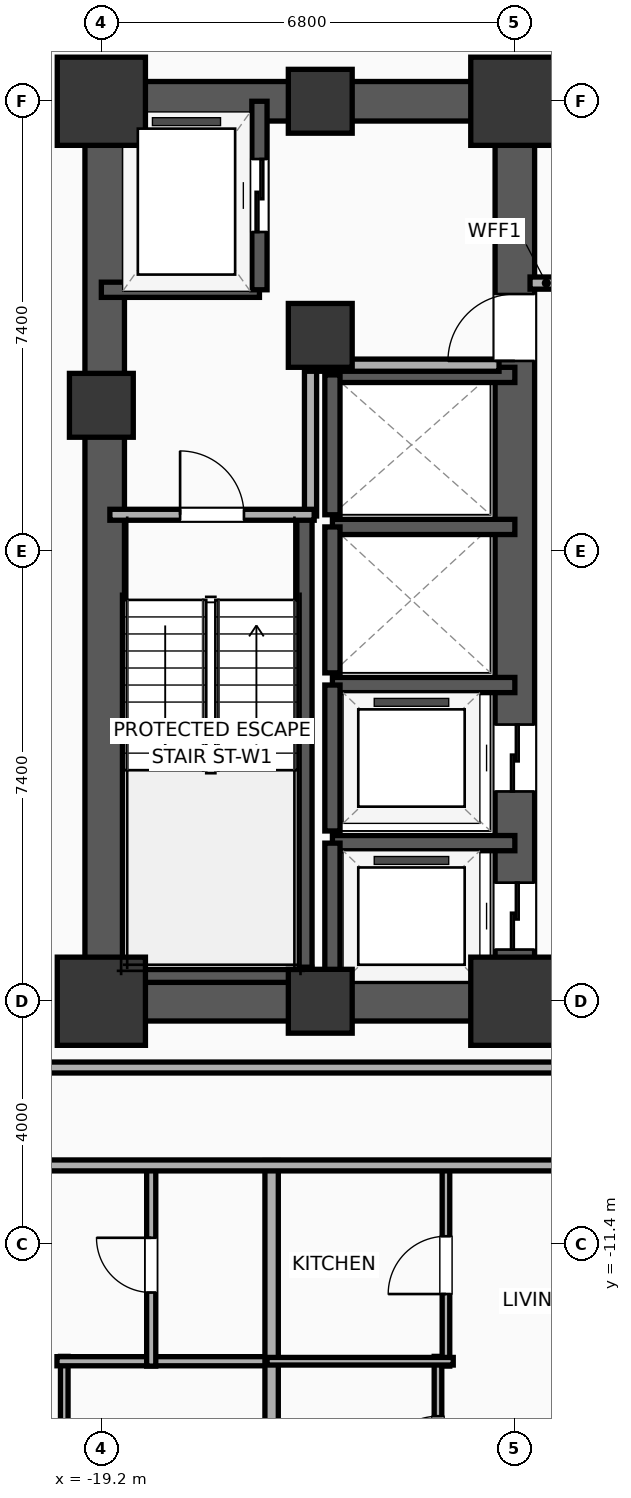
"""IFC4 building model, lengths in metres.
Left out: names, types, materials, properties, quantities, classifications, styles, units other than length and angle.
Written with IfcOpenShell. Run it as: python <this file> out.ifc"""

import sys

from ifc_helpers import new_model, si_unit, direction, frame, frame_2d, origin, origin_2d, place, context, subcontext, project, spatial, rectangle, extrude, element, fill, save


model = new_model("IFC4")
c1 = context("Model", 3, precision=1e-05, world=origin(), true_north=direction((0.0, 1.0)))
c2 = subcontext(c1, "Body", "Model", "MODEL_VIEW")
j1 = project(units=[si_unit("LENGTHUNIT", "METRE"), si_unit("PLANEANGLEUNIT", "RADIAN")], contexts=[c1])
p1 = place(None, origin())
s1 = spatial("IfcSite", under=j1, at=p1, CompositionType="ELEMENT")
p2 = place(p1, origin())
s2 = spatial("IfcBuilding", under=s1, at=p2, CompositionType="ELEMENT")
p3 = place(p2, frame((0.0, 0.0, 41.6)))
s3 = spatial("IfcBuildingStorey", under=s2, at=p3, CompositionType="ELEMENT", Elevation=41.6)
p4 = place(p3, frame((-19.2, -7.4, 0.0), z_axis=(0.0, 0.0, 1.0), x_axis=(1.0, 0.0, 0.0)))
e1 = element("IfcColumn", 1, at=p4, inside=s3, PredefinedType="COLUMN", context=c2, shape_type="SweptSolid", body=[
    extrude(rectangle(XDim=1.45, YDim=1.45, at=origin_2d()), origin(), (0.0, 0.0, 1.0), 3.9),
])
p5 = place(p3, frame((-19.2, 2.4, 0.0), z_axis=(0.0, 0.0, 1.0), x_axis=(1.0, 0.0, 0.0)))
e2 = element("IfcColumn", 2, at=p5, inside=s3, PredefinedType="COLUMN", context=c2, shape_type="SweptSolid", body=[
    extrude(rectangle(XDim=1.05, YDim=1.05, at=origin_2d()), origin(), (0.0, 0.0, 1.0), 3.9),
])
p6 = place(p3, frame((-19.2, 7.4, 0.0), z_axis=(0.0, 0.0, 1.0), x_axis=(1.0, 0.0, 0.0)))
e3 = element("IfcColumn", 3, at=p6, inside=s3, PredefinedType="COLUMN", context=c2, shape_type="SweptSolid", body=[
    extrude(rectangle(XDim=1.45, YDim=1.45, at=origin_2d()), origin(), (0.0, 0.0, 1.0), 3.9),
])
for number, where, z_axis, x_axis in (
    (4, (-15.6, -7.4, 0.0), (0.0, 0.0, 1.0), (1.0, 0.0, 0.0)),
    (5, (-15.6, 7.4, 0.0), (0.0, 0.0, 1.0), (1.0, 0.0, 0.0)),
):
    element("IfcColumn", number, at=place(p3, frame(where, z_axis=z_axis, x_axis=x_axis)), inside=s3, PredefinedType="COLUMN", context=c2, shape_type="SweptSolid", body=[
        extrude(rectangle(XDim=1.05, YDim=1.05, at=origin_2d()), origin(), (0.0, 0.0, 1.0), 3.9),
    ])
p7 = place(p3, frame((-12.4, -7.4, 0.0), z_axis=(0.0, 0.0, 1.0), x_axis=(1.0, 0.0, 0.0)))
e6 = element("IfcColumn", 6, at=p7, inside=s3, PredefinedType="COLUMN", context=c2, shape_type="SweptSolid", body=[
    extrude(rectangle(XDim=1.45, YDim=1.45, at=origin_2d()), origin(), (0.0, 0.0, 1.0), 3.9),
])
p8 = place(p3, frame((-15.6, 3.55, 0.0), z_axis=(0.0, 0.0, 1.0), x_axis=(1.0, 0.0, 0.0)))
e7 = element("IfcColumn", 7, at=p8, inside=s3, PredefinedType="COLUMN", context=c2, shape_type="SweptSolid", body=[
    extrude(rectangle(XDim=1.05, YDim=1.05, at=origin_2d()), origin(), (0.0, 0.0, 1.0), 3.9),
])
p9 = place(p3, frame((-12.4, 7.4, 0.0), z_axis=(0.0, 0.0, 1.0), x_axis=(1.0, 0.0, 0.0)))
e8 = element("IfcColumn", 8, at=p9, inside=s3, PredefinedType="COLUMN", context=c2, shape_type="SweptSolid", body=[
    extrude(rectangle(XDim=1.45, YDim=1.45, at=origin_2d()), origin(), (0.0, 0.0, 1.0), 3.9),
])
for number, where, z_axis, x_axis in (
    (9, (-19.525, -7.4, 0.0), (0.0, 0.0, 1.0), (1.0, 0.0, 0.0)),
    (10, (-19.525, 7.4, 0.0), (0.0, 0.0, 1.0), (1.0, 0.0, 0.0)),
):
    element("IfcWall", number, at=place(p3, frame(where, z_axis=z_axis, x_axis=x_axis)), inside=s3, PredefinedType="SHEAR", context=c2, shape_type="SweptSolid", body=[
        extrude(rectangle(XDim=7.45, YDim=0.65, at=frame_2d((3.725, 0.0))), origin(), (0.0, 0.0, 1.0), 3.65),
    ])
p10 = place(p3, frame((-19.145, -7.4, 0.0), z_axis=(0.0, 0.0, 1.0), x_axis=(0.0, 1.0, 0.0)))
e11 = element("IfcWall", 11, at=p10, inside=s3, PredefinedType="SHEAR", context=c2, shape_type="SweptSolid", body=[
    extrude(rectangle(XDim=14.8, YDim=0.65, at=frame_2d((7.4, 0.0))), origin(), (0.0, 0.0, 1.0), 3.65),
])
p11 = place(p3, frame((-12.4, -7.4, 0.0), z_axis=(0.0, 0.0, 1.0), x_axis=(0.0, 1.0, 0.0)))
e12 = element("IfcWall", 12, at=p11, inside=s3, PredefinedType="SHEAR", context=c2, shape_type="SweptSolid", body=[
    extrude(rectangle(XDim=14.8, YDim=0.65, at=frame_2d((7.4, 0.0))), origin(), (0.0, 0.0, 1.0), 3.65),
])
p12 = place(p11, frame((0.85, 0.0, 0.0)))
e13 = element("IfcOpeningElement", 13, at=p12, cuts=e12, PredefinedType="OPENING", context=c2, shape_type="SweptSolid", body=[
    extrude(rectangle(XDim=1.1, YDim=2.05, at=frame_2d((0.55, 1.025))), frame((0.0, 0.335, 0.0), z_axis=(0.0, -1.0, 0.0), x_axis=(1.0, 0.0, 0.0)), (0.0, 0.0, 1.0), 0.67),
])
p13 = place(p11, frame((3.45, 0.0, 0.0)))
e14 = element("IfcOpeningElement", 14, at=p13, cuts=e12, PredefinedType="OPENING", context=c2, shape_type="SweptSolid", body=[
    extrude(rectangle(XDim=1.1, YDim=2.05, at=frame_2d((0.55, 1.025))), frame((0.0, 0.335, 0.0), z_axis=(0.0, -1.0, 0.0), x_axis=(1.0, 0.0, 0.0)), (0.0, 0.0, 1.0), 0.67),
])
p14 = place(p11, frame((10.53, 0.0, 0.0)))
e15 = element("IfcOpeningElement", 15, at=p14, cuts=e12, PredefinedType="OPENING", context=c2, shape_type="SweptSolid", body=[
    extrude(rectangle(XDim=1.1, YDim=2.05, at=frame_2d((0.55, 1.025))), frame((0.0, 0.335, 0.0), z_axis=(0.0, -1.0, 0.0), x_axis=(1.0, 0.0, 0.0)), (0.0, 0.0, 1.0), 0.67),
])
p15 = place(p3, frame((-15.86, -7.085, 0.0), z_axis=(0.0, 0.0, 1.0), x_axis=(0.0, 1.0, 0.0)))
e16 = element("IfcWall", 16, at=p15, inside=s3, PredefinedType="SOLIDWALL", context=c2, shape_type="SweptSolid", body=[
    extrude(rectangle(XDim=7.685, YDim=0.25, at=frame_2d((3.843, 0.0))), origin(), (0.0, 0.0, 1.0), 3.65),
])
p16 = place(p3, frame((-19.2, -6.965, 0.0), z_axis=(0.0, 0.0, 1.0), x_axis=(1.0, 0.0, 0.0)))
e17 = element("IfcWall", 17, at=p16, inside=s3, PredefinedType="SOLIDWALL", context=c2, shape_type="SweptSolid", body=[
    extrude(rectangle(XDim=3.46, YDim=0.25, at=frame_2d((1.73, 0.0))), origin(), (0.0, 0.0, 1.0), 3.65),
])
p17 = place(p3, frame((-19.2, 4.3, 0.0), z_axis=(0.0, 0.0, 1.0), x_axis=(1.0, 0.0, 0.0)))
e18 = element("IfcWall", 18, at=p17, inside=s3, PredefinedType="SOLIDWALL", context=c2, shape_type="SweptSolid", body=[
    extrude(rectangle(XDim=2.6, YDim=0.25, at=frame_2d((1.3, 0.0))), origin(), (0.0, 0.0, 1.0), 3.65),
])
p18 = place(p3, frame((-16.6, 4.3, 0.0), z_axis=(0.0, 0.0, 1.0), x_axis=(0.0, 1.0, 0.0)))
e19 = element("IfcWall", 19, at=p18, inside=s3, PredefinedType="SOLIDWALL", context=c2, shape_type="SweptSolid", body=[
    extrude(rectangle(XDim=3.1, YDim=0.25, at=frame_2d((1.55, 0.0))), origin(), (0.0, 0.0, 1.0), 3.65),
])
p19 = place(p18, frame((0.95, 0.0, 0.0)))
e20 = element("IfcOpeningElement", 20, at=p19, cuts=e19, PredefinedType="OPENING", context=c2, shape_type="SweptSolid", body=[
    extrude(rectangle(XDim=1.2, YDim=2.05, at=frame_2d((0.6, 1.025))), frame((0.0, 0.135, 0.0), z_axis=(0.0, -1.0, 0.0), x_axis=(1.0, 0.0, 0.0)), (0.0, 0.0, 1.0), 0.27),
])
p20 = place(p3, frame((-12.4, -4.8, 0.0), z_axis=(0.0, 0.0, 1.0), x_axis=(-1.0, 0.0, 0.0)))
e21 = element("IfcWall", 21, at=p20, inside=s3, PredefinedType="SOLIDWALL", context=c2, shape_type="SweptSolid", body=[
    extrude(rectangle(XDim=3.0, YDim=0.25, at=frame_2d((1.5, 0.0))), origin(), (0.0, 0.0, 1.0), 3.65),
])
p21 = place(p3, frame((-15.4, -4.8, 0.0), z_axis=(0.0, 0.0, 1.0), x_axis=(0.0, -1.0, 0.0)))
e22 = element("IfcWall", 22, at=p21, inside=s3, PredefinedType="SOLIDWALL", context=c2, shape_type="SweptSolid", body=[
    extrude(rectangle(XDim=2.6, YDim=0.25, at=frame_2d((1.3, 0.0))), origin(), (0.0, 0.0, 1.0), 3.65),
])
p22 = place(p3, frame((-12.4, -2.2, 0.0), z_axis=(0.0, 0.0, 1.0), x_axis=(-1.0, 0.0, 0.0)))
e23 = element("IfcWall", 23, at=p22, inside=s3, PredefinedType="SOLIDWALL", context=c2, shape_type="SweptSolid", body=[
    extrude(rectangle(XDim=3.0, YDim=0.25, at=frame_2d((1.5, 0.0))), origin(), (0.0, 0.0, 1.0), 3.65),
])
p23 = place(p3, frame((-15.4, -2.2, 0.0), z_axis=(0.0, 0.0, 1.0), x_axis=(0.0, -1.0, 0.0)))
e24 = element("IfcWall", 24, at=p23, inside=s3, PredefinedType="SOLIDWALL", context=c2, shape_type="SweptSolid", body=[
    extrude(rectangle(XDim=2.4, YDim=0.25, at=frame_2d((1.2, 0.0))), origin(), (0.0, 0.0, 1.0), 3.65),
])
p24 = place(p3, frame((-12.4, 0.4, 0.0), z_axis=(0.0, 0.0, 1.0), x_axis=(-1.0, 0.0, 0.0)))
e25 = element("IfcWall", 25, at=p24, inside=s3, PredefinedType="SOLIDWALL", context=c2, shape_type="SweptSolid", body=[
    extrude(rectangle(XDim=3.0, YDim=0.25, at=frame_2d((1.5, 0.0))), origin(), (0.0, 0.0, 1.0), 3.65),
])
p25 = place(p3, frame((-15.4, 0.4, 0.0), z_axis=(0.0, 0.0, 1.0), x_axis=(0.0, -1.0, 0.0)))
e26 = element("IfcWall", 26, at=p25, inside=s3, PredefinedType="SOLIDWALL", context=c2, shape_type="SweptSolid", body=[
    extrude(rectangle(XDim=2.4, YDim=0.25, at=frame_2d((1.2, 0.0))), origin(), (0.0, 0.0, 1.0), 3.65),
])
p26 = place(p3, frame((-12.4, 2.9, 0.0), z_axis=(0.0, 0.0, 1.0), x_axis=(-1.0, 0.0, 0.0)))
e27 = element("IfcWall", 27, at=p26, inside=s3, PredefinedType="SOLIDWALL", context=c2, shape_type="SweptSolid", body=[
    extrude(rectangle(XDim=3.0, YDim=0.25, at=frame_2d((1.5, 0.0))), origin(), (0.0, 0.0, 1.0), 3.65),
])
p27 = place(p3, frame((-15.4, 2.9, 0.0), z_axis=(0.0, 0.0, 1.0), x_axis=(0.0, -1.0, 0.0)))
e28 = element("IfcWall", 28, at=p27, inside=s3, PredefinedType="SOLIDWALL", context=c2, shape_type="SweptSolid", body=[
    extrude(rectangle(XDim=2.3, YDim=0.25, at=frame_2d((1.15, 0.0))), origin(), (0.0, 0.0, 1.0), 3.65),
])
p28 = place(p3, frame((-15.76, 0.58, 0.0), z_axis=(0.0, 0.0, 1.0), x_axis=(0.0, 1.0, 0.0)))
e29 = element("IfcWall", 29, at=p28, inside=s3, PredefinedType="PARTITIONING", context=c2, shape_type="SweptSolid", body=[
    extrude(rectangle(XDim=2.52, YDim=0.2, at=frame_2d((1.26, 0.0))), origin(), (0.0, 0.0, 1.0), 3.65),
])
p29 = place(p3, frame((-15.82, 3.06, 0.0), z_axis=(0.0, 0.0, 1.0), x_axis=(1.0, 0.0, 0.0)))
e30 = element("IfcWall", 30, at=p29, inside=s3, PredefinedType="PARTITIONING", context=c2, shape_type="SweptSolid", body=[
    extrude(rectangle(XDim=3.16, YDim=0.2, at=frame_2d((1.58, 0.0))), origin(), (0.0, 0.0, 1.0), 3.65),
])
p30 = place(p3, frame((-19.06, 0.6, 0.0), z_axis=(0.0, 0.0, 1.0), x_axis=(1.0, 0.0, 0.0)))
e31 = element("IfcWall", 31, at=p30, inside=s3, PredefinedType="PARTITIONING", context=c2, shape_type="SweptSolid", body=[
    extrude(rectangle(XDim=3.36, YDim=0.18, at=frame_2d((1.68, 0.0))), origin(), (0.0, 0.0, 1.0), 3.65),
])
p31 = place(p30, frame((1.155, 0.0, 0.0)))
e32 = element("IfcOpeningElement", 32, at=p31, cuts=e31, PredefinedType="OPENING", context=c2, shape_type="SweptSolid", body=[
    extrude(rectangle(XDim=1.05, YDim=2.05, at=frame_2d((0.525, 1.025))), frame((0.0, 0.1, 0.0), z_axis=(0.0, -1.0, 0.0), x_axis=(1.0, 0.0, 0.0)), (0.0, 0.0, 1.0), 0.2),
])
p32 = place(p3, frame((-12.15, 4.41, 0.0), z_axis=(0.0, 0.0, 1.0), x_axis=(1.0, 0.0, 0.0)))
e33 = element("IfcWall", 33, at=p32, inside=s3, PredefinedType="PARTITIONING", context=c2, shape_type="SweptSolid", body=[
    extrude(rectangle(XDim=2.27, YDim=0.2, at=frame_2d((1.135, 0.0))), origin(), (0.0, 0.0, 1.0), 3.65),
])
p33 = place(p32, frame((0.685, 0.0, 0.0)))
e34 = element("IfcOpeningElement", 34, at=p33, cuts=e33, PredefinedType="OPENING", context=c2, shape_type="SweptSolid", body=[
    extrude(rectangle(XDim=0.9, YDim=2.05, at=frame_2d((0.45, 1.025))), frame((0.0, 0.11, 0.0), z_axis=(0.0, -1.0, 0.0), x_axis=(1.0, 0.0, 0.0)), (0.0, 0.0, 1.0), 0.22),
])
for number, where, z_axis, x_axis in (
    (35, (-12.15, 7.12, 0.0), (0.0, 0.0, 1.0), (1.0, 0.0, 0.0)),
    (36, (-12.15, -7.12, 0.0), (0.0, 0.0, 1.0), (1.0, 0.0, 0.0)),
):
    element("IfcWall", number, at=place(p3, frame(where, z_axis=z_axis, x_axis=x_axis)), inside=s3, PredefinedType="PARTITIONING", context=c2, shape_type="SweptSolid", body=[
        extrude(rectangle(XDim=2.27, YDim=0.18, at=frame_2d((1.135, 0.0))), origin(), (0.0, 0.0, 1.0), 2.94),
    ])
p34 = place(p3, frame((-33.41, -8.49, 0.0), z_axis=(0.0, 0.0, 1.0), x_axis=(1.0, 0.0, 0.0)))
e37 = element("IfcWall", 37, at=p34, inside=s3, PredefinedType="PARTITIONING", context=c2, shape_type="SweptSolid", body=[
    extrude(rectangle(XDim=23.53, YDim=0.18, at=frame_2d((11.765, 0.0))), origin(), (0.0, 0.0, 1.0), 3.65),
])
p35 = place(p3, frame((-19.81, -22.36, 0.0), z_axis=(0.0, 0.0, 1.0), x_axis=(0.0, 1.0, 0.0)))
e38 = element("IfcWall", 38, at=p35, inside=s3, PredefinedType="PARTITIONING", context=c2, shape_type="SweptSolid", body=[
    extrude(rectangle(XDim=9.12, YDim=0.125, at=frame_2d((4.56, 0.0))), origin(), (0.0, 0.0, 1.0), 3.65),
])
p36 = place(p35, frame((6.481, 0.0, 0.0)))
e39 = element("IfcOpeningElement", 39, at=p36, cuts=e38, PredefinedType="OPENING", context=c2, shape_type="SweptSolid", body=[
    extrude(rectangle(XDim=0.9, YDim=2.05, at=frame_2d((0.45, 1.025))), frame((0.0, 0.073, 0.0), z_axis=(0.0, -1.0, 0.0), x_axis=(1.0, 0.0, 0.0)), (0.0, 0.0, 1.0), 0.145),
])
p37 = place(p3, frame((-19.93, -13.32, 0.0), z_axis=(0.0, 0.0, 1.0), x_axis=(1.0, 0.0, 0.0)))
e40 = element("IfcWall", 40, at=p37, inside=s3, PredefinedType="PLUMBINGWALL", context=c2, shape_type="SweptSolid", body=[
    extrude(rectangle(XDim=3.605, YDim=0.15, at=frame_2d((1.802, 0.0))), origin(), (0.0, 0.0, 1.0), 3.65),
])
p38 = place(p3, frame((-18.38, -13.4, 0.0), z_axis=(0.0, 0.0, 1.0), x_axis=(0.0, 1.0, 0.0)))
e41 = element("IfcWall", 41, at=p38, inside=s3, PredefinedType="PLUMBINGWALL", context=c2, shape_type="SweptSolid", body=[
    extrude(rectangle(XDim=3.32, YDim=0.15, at=frame_2d((1.66, 0.0))), origin(), (0.0, 0.0, 1.0), 3.65),
])
p39 = place(p38, frame((1.21, 0.0, 0.0)))
e42 = element("IfcOpeningElement", 42, at=p39, cuts=e41, PredefinedType="OPENING", context=c2, shape_type="SweptSolid", body=[
    extrude(rectangle(XDim=0.9, YDim=2.05, at=frame_2d((0.45, 1.025))), frame((0.0, 0.085, 0.0), z_axis=(0.0, -1.0, 0.0), x_axis=(1.0, 0.0, 0.0)), (0.0, 0.0, 1.0), 0.17),
])
p40 = place(p3, frame((-16.4, -22.21, 0.0), z_axis=(0.0, 0.0, 1.0), x_axis=(0.0, 1.0, 0.0)))
e43 = element("IfcWall", 43, at=p40, inside=s3, PredefinedType="PARTITIONING", context=c2, shape_type="SweptSolid", body=[
    extrude(rectangle(XDim=12.19, YDim=0.22, at=frame_2d((6.095, 0.0))), origin(), (0.0, 0.0, 1.0), 3.65),
])
p41 = place(p3, frame((-13.664, -22.36, 0.0), z_axis=(0.0, 0.0, 1.0), x_axis=(0.0, 1.0, 0.0)))
e44 = element("IfcWall", 44, at=p41, inside=s3, PredefinedType="PARTITIONING", context=c2, shape_type="SweptSolid", body=[
    extrude(rectangle(XDim=9.12, YDim=0.125, at=frame_2d((4.56, 0.0))), origin(), (0.0, 0.0, 1.0), 3.65),
])
p42 = place(p41, frame((7.186, 0.0, 0.0)))
e45 = element("IfcOpeningElement", 45, at=p42, cuts=e44, PredefinedType="OPENING", context=c2, shape_type="SweptSolid", body=[
    extrude(rectangle(XDim=0.95, YDim=2.05, at=frame_2d((0.475, 1.025))), frame((0.0, 0.073, 0.0), z_axis=(0.0, -1.0, 0.0), x_axis=(1.0, 0.0, 0.0)), (0.0, 0.0, 1.0), 0.145),
])
p43 = place(p3, frame((-13.533, -13.4, 0.0), z_axis=(0.0, 0.0, 1.0), x_axis=(0.0, 1.0, 0.0)))
e46 = element("IfcWall", 46, at=p43, inside=s3, PredefinedType="PARTITIONING", context=c2, shape_type="SweptSolid", body=[
    extrude(rectangle(XDim=3.32, YDim=0.125, at=frame_2d((1.66, 0.0))), origin(), (0.0, 0.0, 1.0), 3.65),
])
p44 = place(p43, frame((1.185, 0.0, 0.0)))
e47 = element("IfcOpeningElement", 47, at=p44, cuts=e46, PredefinedType="OPENING", context=c2, shape_type="SweptSolid", body=[
    extrude(rectangle(XDim=0.95, YDim=2.05, at=frame_2d((0.475, 1.025))), frame((0.0, 0.073, 0.0), z_axis=(0.0, -1.0, 0.0), x_axis=(1.0, 0.0, 0.0)), (0.0, 0.0, 1.0), 0.145),
])
p45 = place(p3, frame((-16.475, -13.32, 0.0), z_axis=(0.0, 0.0, 1.0), x_axis=(1.0, 0.0, 0.0)))
e48 = element("IfcWall", 48, at=p45, inside=s3, PredefinedType="PARTITIONING", context=c2, shape_type="SweptSolid", body=[
    extrude(rectangle(XDim=3.062, YDim=0.125, at=frame_2d((1.531, 0.0))), origin(), (0.0, 0.0, 1.0), 3.65),
])
p46 = place(p3, frame((-33.41, -10.1, 0.0), z_axis=(0.0, 0.0, 1.0), x_axis=(1.0, 0.0, 0.0)))
e49 = element("IfcWall", 49, at=p46, inside=s3, PredefinedType="PARTITIONING", context=c2, shape_type="SweptSolid", body=[
    extrude(rectangle(XDim=59.62, YDim=0.18, at=frame_2d((29.81, 0.0))), origin(), (0.0, 0.0, 1.0), 3.65),
])
p47 = place(p46, frame((2.746, 0.0, 0.0)))
e50 = element("IfcOpeningElement", 50, at=p47, cuts=e49, PredefinedType="OPENING", context=c2, shape_type="SweptSolid", body=[
    extrude(rectangle(XDim=0.9, YDim=2.05, at=frame_2d((0.45, 1.025))), frame((0.0, 0.1, 0.0), z_axis=(0.0, -1.0, 0.0), x_axis=(1.0, 0.0, 0.0)), (0.0, 0.0, 1.0), 0.2),
])
p48 = place(p46, frame((11.552, 0.0, 0.0)))
e51 = element("IfcOpeningElement", 51, at=p48, cuts=e49, PredefinedType="OPENING", context=c2, shape_type="SweptSolid", body=[
    extrude(rectangle(XDim=1.15, YDim=2.05, at=frame_2d((0.575, 1.025))), frame((0.0, 0.1, 0.0), z_axis=(0.0, -1.0, 0.0), x_axis=(1.0, 0.0, 0.0)), (0.0, 0.0, 1.0), 0.2),
])
p49 = place(p46, frame((22.379, 0.0, 0.0)))
e52 = element("IfcOpeningElement", 52, at=p49, cuts=e49, PredefinedType="OPENING", context=c2, shape_type="SweptSolid", body=[
    extrude(rectangle(XDim=1.15, YDim=2.05, at=frame_2d((0.575, 1.025))), frame((0.0, 0.1, 0.0), z_axis=(0.0, -1.0, 0.0), x_axis=(1.0, 0.0, 0.0)), (0.0, 0.0, 1.0), 0.2),
])
p50 = place(p46, frame((31.28, 0.0, 0.0)))
e53 = element("IfcOpeningElement", 53, at=p50, cuts=e49, PredefinedType="OPENING", context=c2, shape_type="SweptSolid", body=[
    extrude(rectangle(XDim=1.15, YDim=2.05, at=frame_2d((0.575, 1.025))), frame((0.0, 0.1, 0.0), z_axis=(0.0, -1.0, 0.0), x_axis=(1.0, 0.0, 0.0)), (0.0, 0.0, 1.0), 0.2),
])
p51 = place(p46, frame((36.02, 0.0, 0.0)))
e54 = element("IfcOpeningElement", 54, at=p51, cuts=e49, PredefinedType="OPENING", context=c2, shape_type="SweptSolid", body=[
    extrude(rectangle(XDim=0.9, YDim=2.05, at=frame_2d((0.45, 1.025))), frame((0.0, 0.1, 0.0), z_axis=(0.0, -1.0, 0.0), x_axis=(1.0, 0.0, 0.0)), (0.0, 0.0, 1.0), 0.2),
])
p52 = place(p46, frame((40.044, 0.0, 0.0)))
e55 = element("IfcOpeningElement", 55, at=p52, cuts=e49, PredefinedType="OPENING", context=c2, shape_type="SweptSolid", body=[
    extrude(rectangle(XDim=1.15, YDim=2.05, at=frame_2d((0.575, 1.025))), frame((0.0, 0.1, 0.0), z_axis=(0.0, -1.0, 0.0), x_axis=(1.0, 0.0, 0.0)), (0.0, 0.0, 1.0), 0.2),
])
p53 = place(p46, frame((45.613, 0.0, 0.0)))
e56 = element("IfcOpeningElement", 56, at=p53, cuts=e49, PredefinedType="OPENING", context=c2, shape_type="SweptSolid", body=[
    extrude(rectangle(XDim=1.15, YDim=2.05, at=frame_2d((0.575, 1.025))), frame((0.0, 0.1, 0.0), z_axis=(0.0, -1.0, 0.0), x_axis=(1.0, 0.0, 0.0)), (0.0, 0.0, 1.0), 0.2),
])
p54 = place(p46, frame((54.174, 0.0, 0.0)))
e57 = element("IfcOpeningElement", 57, at=p54, cuts=e49, PredefinedType="OPENING", context=c2, shape_type="SweptSolid", body=[
    extrude(rectangle(XDim=1.15, YDim=2.05, at=frame_2d((0.575, 1.025))), frame((0.0, 0.1, 0.0), z_axis=(0.0, -1.0, 0.0), x_axis=(1.0, 0.0, 0.0)), (0.0, 0.0, 1.0), 0.2),
])
p55 = place(p19, origin())
e58 = element("IfcDoor", 58, at=p55, inside=s3, OperationType="SLIDING_TO_LEFT", PredefinedType="DOOR", context=c2, shape_type="SweptSolid", body=[
    extrude(rectangle(XDim=1.2, YDim=2.05, at=frame_2d((0.6, 1.025))), frame((0.0, 0.025, 0.0), z_axis=(0.0, -1.0, 0.0), x_axis=(1.0, 0.0, 0.0)), (0.0, 0.0, 1.0), 0.05),
])
fill(e20, e58)
p56 = place(p12, origin())
e59 = element("IfcDoor", 59, at=p56, inside=s3, OperationType="SLIDING_TO_LEFT", PredefinedType="DOOR", context=c2, shape_type="SweptSolid", body=[
    extrude(rectangle(XDim=1.1, YDim=2.05, at=frame_2d((0.55, 1.025))), frame((0.0, 0.025, 0.0), z_axis=(0.0, -1.0, 0.0), x_axis=(1.0, 0.0, 0.0)), (0.0, 0.0, 1.0), 0.05),
])
fill(e13, e59)
p57 = place(p13, origin())
e60 = element("IfcDoor", 60, at=p57, inside=s3, OperationType="SLIDING_TO_LEFT", PredefinedType="DOOR", context=c2, shape_type="SweptSolid", body=[
    extrude(rectangle(XDim=1.1, YDim=2.05, at=frame_2d((0.55, 1.025))), frame((0.0, 0.025, 0.0), z_axis=(0.0, -1.0, 0.0), x_axis=(1.0, 0.0, 0.0)), (0.0, 0.0, 1.0), 0.05),
])
fill(e14, e60)
p58 = place(p31, origin())
e61 = element("IfcDoor", 61, at=p58, inside=s3, OperationType="SINGLE_SWING_LEFT", PredefinedType="DOOR", context=c2, shape_type="SweptSolid", body=[
    extrude(rectangle(XDim=1.05, YDim=2.05, at=frame_2d((0.525, 1.025))), frame((0.0, 0.025, 0.0), z_axis=(0.0, -1.0, 0.0), x_axis=(1.0, 0.0, 0.0)), (0.0, 0.0, 1.0), 0.05),
])
fill(e32, e61)
p59 = place(p39, origin())
e62 = element("IfcDoor", 62, at=p59, inside=s3, OperationType="SINGLE_SWING_RIGHT", PredefinedType="DOOR", context=c2, shape_type="SweptSolid", body=[
    extrude(rectangle(XDim=0.9, YDim=2.05, at=frame_2d((0.45, 1.025))), frame((0.0, 0.025, 0.0), z_axis=(0.0, -1.0, 0.0), x_axis=(1.0, 0.0, 0.0)), (0.0, 0.0, 1.0), 0.05),
])
fill(e42, e62)
p60 = place(p42, origin())
e63 = element("IfcDoor", 63, at=p60, inside=s3, OperationType="SINGLE_SWING_LEFT", PredefinedType="DOOR", context=c2, shape_type="SweptSolid", body=[
    extrude(rectangle(XDim=0.95, YDim=2.05, at=frame_2d((0.475, 1.025))), frame((0.0, 0.025, 0.0), z_axis=(0.0, -1.0, 0.0), x_axis=(1.0, 0.0, 0.0)), (0.0, 0.0, 1.0), 0.05),
])
fill(e45, e63)
p61 = place(p44, origin())
e64 = element("IfcDoor", 64, at=p61, inside=s3, OperationType="SINGLE_SWING_LEFT", PredefinedType="DOOR", context=c2, shape_type="SweptSolid", body=[
    extrude(rectangle(XDim=0.95, YDim=2.05, at=frame_2d((0.475, 1.025))), frame((0.0, 0.025, 0.0), z_axis=(0.0, -1.0, 0.0), x_axis=(1.0, 0.0, 0.0)), (0.0, 0.0, 1.0), 0.05),
])
fill(e47, e64)
p62 = place(p14, origin())
e65 = element("IfcDoor", 65, at=p62, inside=s3, OperationType="SINGLE_SWING_LEFT", PredefinedType="DOOR", context=c2, shape_type="SweptSolid", body=[
    extrude(rectangle(XDim=1.1, YDim=2.05, at=frame_2d((0.55, 1.025))), frame((0.0, 0.025, 0.0), z_axis=(0.0, -1.0, 0.0), x_axis=(1.0, 0.0, 0.0)), (0.0, 0.0, 1.0), 0.05),
])
fill(e15, e65)
save(model, sys.argv[1])
